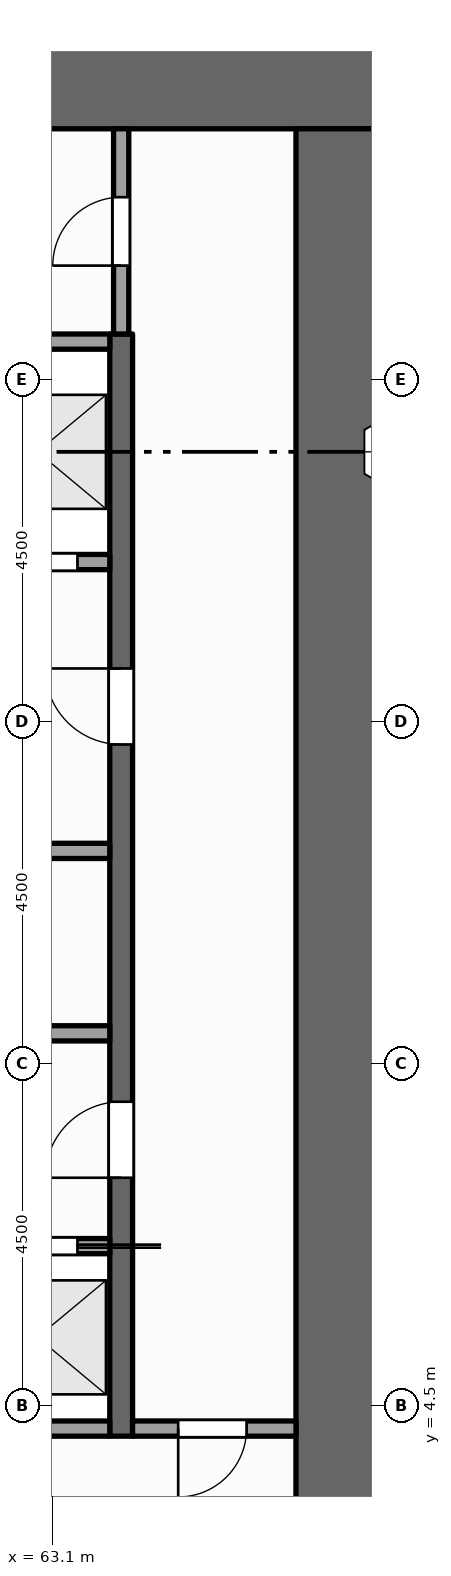
"""IFC4 building model, lengths in metres.
Left out: names, types, materials, properties, quantities, classifications, styles, units other than length and angle.
Written with IfcOpenShell. Run it as: python <this file> out.ifc"""

import sys

from ifc_helpers import new_model, si_unit, direction, frame, frame_2d, origin, place, context, subcontext, project, spatial, rectangle, extrude, element, fill, save


model = new_model("IFC4")
c1 = context("Model", 3, precision=1e-05, world=origin(), true_north=direction((0.0, 1.0)))
c2 = subcontext(c1, "Body", "Model", "MODEL_VIEW")
j1 = project(units=[si_unit("LENGTHUNIT", "METRE"), si_unit("PLANEANGLEUNIT", "RADIAN")], contexts=[c1])
p1 = place(None, origin())
s1 = spatial("IfcSite", under=j1, at=p1, CompositionType="ELEMENT")
p2 = place(p1, origin())
s2 = spatial("IfcBuilding", under=s1, at=p2, CompositionType="ELEMENT")
p3 = place(p2, frame((0.0, 0.0, 83.0)))
s3 = spatial("IfcBuildingStorey", under=s2, at=p3, CompositionType="ELEMENT", Elevation=83.0)
p4 = place(p3, frame((54.0, 21.9, -0.15), z_axis=(0.0, 0.0, 1.0), x_axis=(1.0, 0.0, 0.0)))
e1 = element("IfcWall", 1, at=p4, inside=s3, PredefinedType="SHEAR", context=c2, shape_type="SweptSolid", body=[
    extrude(rectangle(XDim=13.5, YDim=1.2, at=frame_2d((6.75, 0.0))), origin(), (0.0, 0.0, 1.0), 4.0),
])
p5 = place(p3, frame((66.9, 1.2, -0.15), z_axis=(0.0, 0.0, 1.0), x_axis=(0.0, 1.0, 0.0)))
e2 = element("IfcWall", 2, at=p5, inside=s3, PredefinedType="SHEAR", context=c2, shape_type="SweptSolid", body=[
    extrude(rectangle(XDim=20.1, YDim=1.2, at=frame_2d((10.05, 0.0))), origin(), (0.0, 0.0, 1.0), 4.0),
])
p6 = place(p3, frame((64.0, 4.1, 0.0), z_axis=(0.0, 0.0, 1.0), x_axis=(0.0, 1.0, 0.0)))
e3 = element("IfcWall", 3, at=p6, inside=s3, PredefinedType="SHEAR", context=c2, shape_type="SweptSolid", body=[
    extrude(rectangle(XDim=14.5, YDim=0.3, at=frame_2d((7.25, 0.0))), origin(), (0.0, 0.0, 1.0), 3.85),
])
p7 = place(p6, frame((3.4, 0.0, 0.0)))
e4 = element("IfcOpeningElement", 4, at=p7, cuts=e3, PredefinedType="OPENING", context=c2, shape_type="SweptSolid", body=[
    extrude(rectangle(XDim=1.0, YDim=2.1, at=frame_2d((0.5, 1.05))), frame((0.0, 0.16, 0.0), z_axis=(0.0, -1.0, 0.0), x_axis=(1.0, 0.0, 0.0)), (0.0, 0.0, 1.0), 0.32),
])
p8 = place(p6, frame((9.1, 0.0, 0.0)))
e5 = element("IfcOpeningElement", 5, at=p8, cuts=e3, PredefinedType="OPENING", context=c2, shape_type="SweptSolid", body=[
    extrude(rectangle(XDim=1.0, YDim=2.1, at=frame_2d((0.5, 1.05))), frame((0.0, 0.16, 0.0), z_axis=(0.0, -1.0, 0.0), x_axis=(1.0, 0.0, 0.0)), (0.0, 0.0, 1.0), 0.32),
])
p9 = place(p3, frame((64.0, 18.6, 0.0), z_axis=(0.0, 0.0, 1.0), x_axis=(0.0, 1.0, 0.0)))
e6 = element("IfcWall", 6, at=p9, inside=s3, PredefinedType="PARTITIONING", context=c2, shape_type="SweptSolid", body=[
    extrude(rectangle(XDim=2.7, YDim=0.2, at=frame_2d((1.35, 0.0))), origin(), (0.0, 0.0, 1.0), 3.85),
])
p10 = place(p9, frame((0.9, 0.0, 0.0)))
e7 = element("IfcOpeningElement", 7, at=p10, cuts=e6, PredefinedType="OPENING", context=c2, shape_type="SweptSolid", body=[
    extrude(rectangle(XDim=0.9, YDim=2.1, at=frame_2d((0.45, 1.05))), frame((0.0, 0.11, 0.0), z_axis=(0.0, -1.0, 0.0), x_axis=(1.0, 0.0, 0.0)), (0.0, 0.0, 1.0), 0.22),
])
p11 = place(p3, frame((61.9, 4.2, 0.0), z_axis=(0.0, 0.0, 1.0), x_axis=(1.0, 0.0, 0.0)))
e8 = element("IfcWall", 8, at=p11, inside=s3, PredefinedType="SOLIDWALL", context=c2, shape_type="SweptSolid", body=[
    extrude(rectangle(XDim=1.95, YDim=0.2, at=frame_2d((0.975, 0.0))), origin(), (0.0, 0.0, 1.0), 3.85),
])
p12 = place(p3, frame((64.15, 4.2, 0.0), z_axis=(0.0, 0.0, 1.0), x_axis=(1.0, 0.0, 0.0)))
e9 = element("IfcWall", 9, at=p12, inside=s3, PredefinedType="PARTITIONING", context=c2, shape_type="SweptSolid", body=[
    extrude(rectangle(XDim=2.15, YDim=0.2, at=frame_2d((1.075, 0.0))), origin(), (0.0, 0.0, 1.0), 3.85),
])
p13 = place(p12, frame((0.6, 0.0, 0.0)))
e10 = element("IfcOpeningElement", 10, at=p13, cuts=e9, PredefinedType="OPENING", context=c2, shape_type="SweptSolid", body=[
    extrude(rectangle(XDim=0.9, YDim=2.1, at=frame_2d((0.45, 1.05))), frame((0.0, 0.11, 0.0), z_axis=(0.0, -1.0, 0.0), x_axis=(1.0, 0.0, 0.0)), (0.0, 0.0, 1.0), 0.22),
])
p14 = place(p3, frame((61.9, 6.6, 0.0), z_axis=(0.0, 0.0, 1.0), x_axis=(1.0, 0.0, 0.0)))
e11 = element("IfcWall", 11, at=p14, inside=s3, PredefinedType="SOLIDWALL", context=c2, shape_type="SweptSolid", body=[
    extrude(rectangle(XDim=1.95, YDim=0.2, at=frame_2d((0.975, 0.0))), origin(), (0.0, 0.0, 1.0), 3.85),
])
p15 = place(p14, frame((0.425, 0.0, 0.012)))
e12 = element("IfcOpeningElement", 12, at=p15, cuts=e11, PredefinedType="OPENING", context=c2, shape_type="SweptSolid", body=[
    extrude(rectangle(XDim=1.1, YDim=2.1, at=frame_2d((0.55, 1.05))), frame((0.0, 0.11, 0.0), z_axis=(0.0, -1.0, 0.0), x_axis=(1.0, 0.0, 0.0)), (0.0, 0.0, 1.0), 0.22),
])
p16 = place(p3, frame((59.7, 9.4, 0.0), z_axis=(0.0, 0.0, 1.0), x_axis=(1.0, 0.0, 0.0)))
e13 = element("IfcWall", 13, at=p16, inside=s3, PredefinedType="PARTITIONING", context=c2, shape_type="SweptSolid", body=[
    extrude(rectangle(XDim=4.15, YDim=0.2, at=frame_2d((2.075, 0.0))), origin(), (0.0, 0.0, 1.0), 3.85),
])
p17 = place(p16, frame((1.625, 0.0, 0.0)))
e14 = element("IfcOpeningElement", 14, at=p17, cuts=e13, PredefinedType="OPENING", context=c2, shape_type="SweptSolid", body=[
    extrude(rectangle(XDim=0.9, YDim=2.1, at=frame_2d((0.45, 1.05))), frame((0.0, 0.11, 0.0), z_axis=(0.0, -1.0, 0.0), x_axis=(1.0, 0.0, 0.0)), (0.0, 0.0, 1.0), 0.22),
])
p18 = place(p3, frame((59.7, 11.8, 0.0), z_axis=(0.0, 0.0, 1.0), x_axis=(1.0, 0.0, 0.0)))
e15 = element("IfcWall", 15, at=p18, inside=s3, PredefinedType="PARTITIONING", context=c2, shape_type="SweptSolid", body=[
    extrude(rectangle(XDim=4.15, YDim=0.2, at=frame_2d((2.075, 0.0))), origin(), (0.0, 0.0, 1.0), 3.85),
])
p19 = place(p3, frame((61.9, 15.6, 0.0), z_axis=(0.0, 0.0, 1.0), x_axis=(1.0, 0.0, 0.0)))
e16 = element("IfcWall", 16, at=p19, inside=s3, PredefinedType="SOLIDWALL", context=c2, shape_type="SweptSolid", body=[
    extrude(rectangle(XDim=1.95, YDim=0.2, at=frame_2d((0.975, 0.0))), origin(), (0.0, 0.0, 1.0), 3.85),
])
p20 = place(p19, frame((0.425, 0.0, 0.012)))
e17 = element("IfcOpeningElement", 17, at=p20, cuts=e16, PredefinedType="OPENING", context=c2, shape_type="SweptSolid", body=[
    extrude(rectangle(XDim=1.1, YDim=2.1, at=frame_2d((0.55, 1.05))), frame((0.0, 0.11, 0.0), z_axis=(0.0, -1.0, 0.0), x_axis=(1.0, 0.0, 0.0)), (0.0, 0.0, 1.0), 0.22),
])
p21 = place(p3, frame((61.9, 18.5, 0.0), z_axis=(0.0, 0.0, 1.0), x_axis=(1.0, 0.0, 0.0)))
e18 = element("IfcWall", 18, at=p21, inside=s3, PredefinedType="SOLIDWALL", context=c2, shape_type="SweptSolid", body=[
    extrude(rectangle(XDim=1.95, YDim=0.2, at=frame_2d((0.975, 0.0))), origin(), (0.0, 0.0, 1.0), 3.85),
])
p22 = place(p15, origin())
e19 = element("IfcDoor", 19, at=p22, inside=s3, OperationType="SLIDING_TO_RIGHT", PredefinedType="DOOR", context=c2, shape_type="SweptSolid", body=[
    extrude(rectangle(XDim=1.1, YDim=2.1, at=frame_2d((0.55, 1.05))), frame((0.0, 0.025, 0.0), z_axis=(0.0, -1.0, 0.0), x_axis=(1.0, 0.0, 0.0)), (0.0, 0.0, 1.0), 0.05),
])
fill(e12, e19)
p23 = place(p20, origin())
e20 = element("IfcDoor", 20, at=p23, inside=s3, OperationType="SLIDING_TO_LEFT", PredefinedType="DOOR", context=c2, shape_type="SweptSolid", body=[
    extrude(rectangle(XDim=1.1, YDim=2.1, at=frame_2d((0.55, 1.05))), frame((0.0, 0.025, 0.0), z_axis=(0.0, -1.0, 0.0), x_axis=(1.0, 0.0, 0.0)), (0.0, 0.0, 1.0), 0.05),
])
fill(e17, e20)
p24 = place(p7, origin())
e21 = element("IfcDoor", 21, at=p24, inside=s3, OperationType="SINGLE_SWING_LEFT", PredefinedType="DOOR", context=c2, shape_type="SweptSolid", body=[
    extrude(rectangle(XDim=1.0, YDim=2.1, at=frame_2d((0.5, 1.05))), frame((0.0, 0.025, 0.0), z_axis=(0.0, -1.0, 0.0), x_axis=(1.0, 0.0, 0.0)), (0.0, 0.0, 1.0), 0.05),
])
fill(e4, e21)
p25 = place(p8, origin())
e22 = element("IfcDoor", 22, at=p25, inside=s3, OperationType="SINGLE_SWING_RIGHT", PredefinedType="DOOR", context=c2, shape_type="SweptSolid", body=[
    extrude(rectangle(XDim=1.0, YDim=2.1, at=frame_2d((0.5, 1.05))), frame((0.0, 0.025, 0.0), z_axis=(0.0, -1.0, 0.0), x_axis=(1.0, 0.0, 0.0)), (0.0, 0.0, 1.0), 0.05),
])
fill(e5, e22)
p26 = place(p13, origin())
e23 = element("IfcDoor", 23, at=p26, inside=s3, OperationType="SINGLE_SWING_LEFT", PredefinedType="DOOR", context=c2, shape_type="SweptSolid", body=[
    extrude(rectangle(XDim=0.9, YDim=2.1, at=frame_2d((0.45, 1.05))), frame((0.0, 0.025, 0.0), z_axis=(0.0, -1.0, 0.0), x_axis=(1.0, 0.0, 0.0)), (0.0, 0.0, 1.0), 0.05),
])
fill(e10, e23)
p27 = place(p10, origin())
e24 = element("IfcDoor", 24, at=p27, inside=s3, OperationType="SINGLE_SWING_LEFT", PredefinedType="DOOR", context=c2, shape_type="SweptSolid", body=[
    extrude(rectangle(XDim=0.9, YDim=2.1, at=frame_2d((0.45, 1.05))), frame((0.0, 0.025, 0.0), z_axis=(0.0, -1.0, 0.0), x_axis=(1.0, 0.0, 0.0)), (0.0, 0.0, 1.0), 0.05),
])
fill(e7, e24)
save(model, sys.argv[1])
